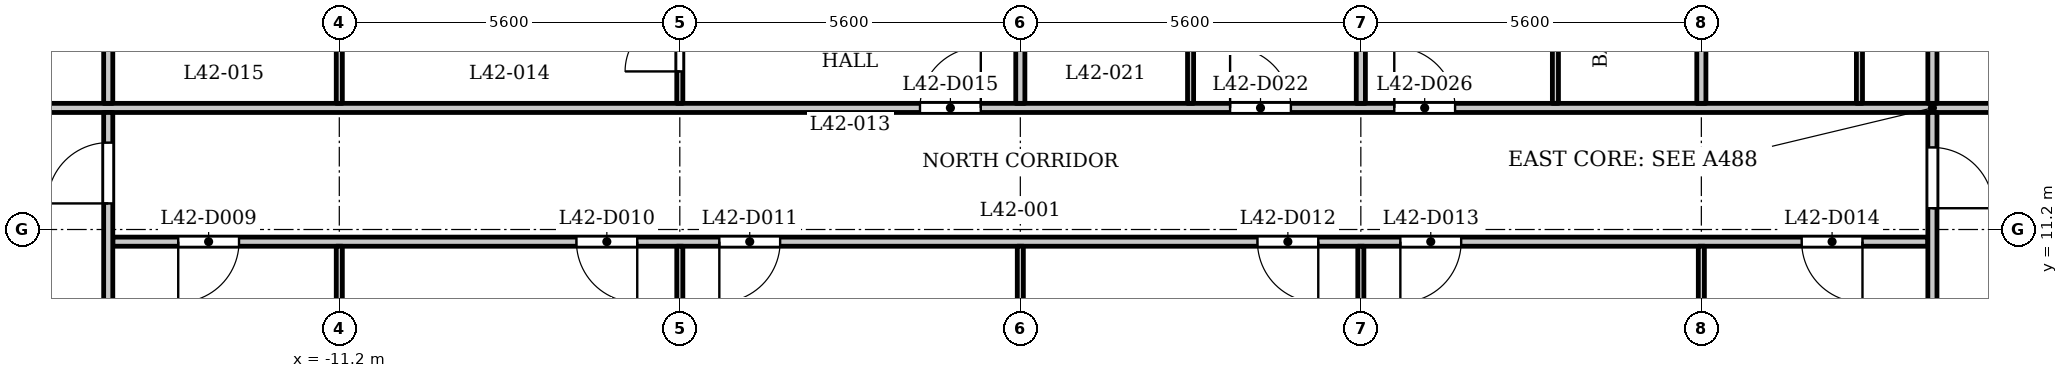
"""IFC4 building model, lengths in metres.
Left out: names, types, materials, properties, quantities, classifications, styles, units other than length and angle.
Written with IfcOpenShell. Run it as: python <this file> out.ifc"""

import sys

from ifc_helpers import new_model, si_unit, direction, frame, frame_2d, origin, place, context, subcontext, project, spatial, rectangle, extrude, element, fill, save


model = new_model("IFC4")
c1 = context("Model", 3, precision=1e-05, world=origin(), true_north=direction((0.0, 1.0)))
c2 = subcontext(c1, "Body", "Model", "MODEL_VIEW")
j1 = project(units=[si_unit("LENGTHUNIT", "METRE"), si_unit("PLANEANGLEUNIT", "RADIAN")], contexts=[c1])
p1 = place(None, origin())
s1 = spatial("IfcSite", under=j1, at=p1, CompositionType="ELEMENT")
p2 = place(p1, origin())
s2 = spatial("IfcBuilding", under=s1, at=p2, CompositionType="ELEMENT")
p3 = place(p2, frame((0.0, 0.0, 164.1)))
s3 = spatial("IfcBuildingStorey", under=s2, at=p3, CompositionType="ELEMENT", Elevation=164.1)
p4 = place(p3, frame((-14.925, 11.0, 0.0), z_axis=(0.0, 0.0, 1.0), x_axis=(1.0, 0.0, 0.0)))
e1 = element("IfcWall", 1, at=p4, inside=s3, PredefinedType="PARTITIONING", context=c2, shape_type="SweptSolid", body=[
    extrude(rectangle(XDim=29.85, YDim=0.15, at=frame_2d((14.925, 0.0))), origin(), (0.0, 0.0, 1.0), 3.2),
])
p5 = place(p4, frame((1.076, 0.0, 0.0)))
e2 = element("IfcOpeningElement", 2, at=p5, cuts=e1, PredefinedType="OPENING", context=c2, shape_type="SweptSolid", body=[
    extrude(rectangle(XDim=1.0, YDim=2.1, at=frame_2d((0.5, 1.05))), frame((0.0, 0.085, 0.0), z_axis=(0.0, -1.0, 0.0), x_axis=(1.0, 0.0, 0.0)), (0.0, 0.0, 1.0), 0.17),
])
p6 = place(p4, frame((7.625, 0.0, 0.0)))
e3 = element("IfcOpeningElement", 3, at=p6, cuts=e1, PredefinedType="OPENING", context=c2, shape_type="SweptSolid", body=[
    extrude(rectangle(XDim=1.0, YDim=2.1, at=frame_2d((0.5, 1.05))), frame((0.0, 0.085, 0.0), z_axis=(0.0, -1.0, 0.0), x_axis=(1.0, 0.0, 0.0)), (0.0, 0.0, 1.0), 0.17),
])
p7 = place(p4, frame((9.975, 0.0, 0.0)))
e4 = element("IfcOpeningElement", 4, at=p7, cuts=e1, PredefinedType="OPENING", context=c2, shape_type="SweptSolid", body=[
    extrude(rectangle(XDim=1.0, YDim=2.1, at=frame_2d((0.5, 1.05))), frame((0.0, 0.085, 0.0), z_axis=(0.0, -1.0, 0.0), x_axis=(1.0, 0.0, 0.0)), (0.0, 0.0, 1.0), 0.17),
])
p8 = place(p4, frame((18.825, 0.0, 0.0)))
e5 = element("IfcOpeningElement", 5, at=p8, cuts=e1, PredefinedType="OPENING", context=c2, shape_type="SweptSolid", body=[
    extrude(rectangle(XDim=1.0, YDim=2.1, at=frame_2d((0.5, 1.05))), frame((0.0, 0.085, 0.0), z_axis=(0.0, -1.0, 0.0), x_axis=(1.0, 0.0, 0.0)), (0.0, 0.0, 1.0), 0.17),
])
p9 = place(p4, frame((21.175, 0.0, 0.0)))
e6 = element("IfcOpeningElement", 6, at=p9, cuts=e1, PredefinedType="OPENING", context=c2, shape_type="SweptSolid", body=[
    extrude(rectangle(XDim=1.0, YDim=2.1, at=frame_2d((0.5, 1.05))), frame((0.0, 0.085, 0.0), z_axis=(0.0, -1.0, 0.0), x_axis=(1.0, 0.0, 0.0)), (0.0, 0.0, 1.0), 0.17),
])
p10 = place(p4, frame((27.775, 0.0, 0.0)))
e7 = element("IfcOpeningElement", 7, at=p10, cuts=e1, PredefinedType="OPENING", context=c2, shape_type="SweptSolid", body=[
    extrude(rectangle(XDim=1.0, YDim=2.1, at=frame_2d((0.5, 1.05))), frame((0.0, 0.085, 0.0), z_axis=(0.0, -1.0, 0.0), x_axis=(1.0, 0.0, 0.0)), (0.0, 0.0, 1.0), 0.17),
])
p11 = place(p3, frame((-17.4, 13.2, 0.0), z_axis=(0.0, 0.0, 1.0), x_axis=(1.0, 0.0, 0.0)))
e8 = element("IfcWall", 8, at=p11, inside=s3, PredefinedType="PARTITIONING", context=c2, shape_type="SweptSolid", body=[
    extrude(rectangle(XDim=34.8, YDim=0.15, at=frame_2d((17.4, 0.0))), origin(), (0.0, 0.0, 1.0), 3.2),
])
p12 = place(p11, frame((0.25, 0.0, 0.0)))
e9 = element("IfcOpeningElement", 9, at=p12, cuts=e8, PredefinedType="OPENING", context=c2, shape_type="SweptSolid", body=[
    extrude(rectangle(XDim=1.0, YDim=2.1, at=frame_2d((0.5, 1.05))), frame((0.0, 0.085, 0.0), z_axis=(0.0, -1.0, 0.0), x_axis=(1.0, 0.0, 0.0)), (0.0, 0.0, 1.0), 0.17),
])
p13 = place(p11, frame((33.65, 0.0, 0.0)))
e10 = element("IfcOpeningElement", 10, at=p13, cuts=e8, PredefinedType="OPENING", context=c2, shape_type="SweptSolid", body=[
    extrude(rectangle(XDim=1.0, YDim=2.1, at=frame_2d((0.5, 1.05))), frame((0.0, 0.085, 0.0), z_axis=(0.0, -1.0, 0.0), x_axis=(1.0, 0.0, 0.0)), (0.0, 0.0, 1.0), 0.17),
])
p14 = place(p11, frame((15.75, 0.0, 0.0)))
e11 = element("IfcOpeningElement", 11, at=p14, cuts=e8, PredefinedType="OPENING", context=c2, shape_type="SweptSolid", body=[
    extrude(rectangle(XDim=1.0, YDim=2.1, at=frame_2d((0.5, 1.05))), frame((0.0, 0.085, 0.0), z_axis=(0.0, -1.0, 0.0), x_axis=(1.0, 0.0, 0.0)), (0.0, 0.0, 1.0), 0.17),
])
p15 = place(p11, frame((20.85, 0.0, 0.0)))
e12 = element("IfcOpeningElement", 12, at=p15, cuts=e8, PredefinedType="OPENING", context=c2, shape_type="SweptSolid", body=[
    extrude(rectangle(XDim=1.0, YDim=2.1, at=frame_2d((0.5, 1.05))), frame((0.0, 0.085, 0.0), z_axis=(0.0, -1.0, 0.0), x_axis=(1.0, 0.0, 0.0)), (0.0, 0.0, 1.0), 0.17),
])
p16 = place(p11, frame((23.55, 0.0, 0.0)))
e13 = element("IfcOpeningElement", 13, at=p16, cuts=e8, PredefinedType="OPENING", context=c2, shape_type="SweptSolid", body=[
    extrude(rectangle(XDim=1.0, YDim=2.1, at=frame_2d((0.5, 1.05))), frame((0.0, 0.085, 0.0), z_axis=(0.0, -1.0, 0.0), x_axis=(1.0, 0.0, 0.0)), (0.0, 0.0, 1.0), 0.17),
])
p17 = place(p3, frame((-15.0, 6.769, 0.0), z_axis=(0.0, 0.0, 1.0), x_axis=(0.0, 1.0, 0.0)))
e14 = element("IfcWall", 14, at=p17, inside=s3, PredefinedType="PARTITIONING", context=c2, shape_type="SweptSolid", body=[
    extrude(rectangle(XDim=6.356, YDim=0.15, at=frame_2d((3.178, 0.0))), origin(), (0.0, 0.0, 1.0), 3.2),
])
p18 = place(p17, frame((4.86, 0.0, 0.0)))
e15 = element("IfcOpeningElement", 15, at=p18, cuts=e14, PredefinedType="OPENING", context=c2, shape_type="SweptSolid", body=[
    extrude(rectangle(XDim=1.0, YDim=2.1, at=frame_2d((0.5, 1.05))), frame((0.0, 0.085, 0.0), z_axis=(0.0, -1.0, 0.0), x_axis=(1.0, 0.0, 0.0)), (0.0, 0.0, 1.0), 0.17),
])
p19 = place(p3, frame((-15.0, 13.275, 0.0), z_axis=(0.0, 0.0, 1.0), x_axis=(0.0, 1.0, 0.0)))
e16 = element("IfcWall", 16, at=p19, inside=s3, PredefinedType="PARTITIONING", context=c2, shape_type="SweptSolid", body=[
    extrude(rectangle(XDim=2.05, YDim=0.15, at=frame_2d((1.025, 0.0))), origin(), (0.0, 0.0, 1.0), 3.2),
])
p20 = place(p3, frame((-11.2, 7.32, 0.0), z_axis=(0.0, 0.0, 1.0), x_axis=(0.0, 1.0, 0.0)))
e17 = element("IfcWall", 17, at=p20, inside=s3, PredefinedType="PARTITIONING", context=c2, shape_type="SweptSolid", body=[
    extrude(rectangle(XDim=3.605, YDim=0.1, at=frame_2d((1.802, 0.0))), origin(), (0.0, 0.0, 1.0), 3.2),
])
p21 = place(p3, frame((-11.2, 13.275, 0.0), z_axis=(0.0, 0.0, 1.0), x_axis=(0.0, 1.0, 0.0)))
e18 = element("IfcWall", 18, at=p21, inside=s3, PredefinedType="PARTITIONING", context=c2, shape_type="SweptSolid", body=[
    extrude(rectangle(XDim=3.775, YDim=0.1, at=frame_2d((1.888, 0.0))), origin(), (0.0, 0.0, 1.0), 3.2),
])
p22 = place(p21, frame((2.875, 0.0, 0.0)))
e19 = element("IfcOpeningElement", 19, at=p22, cuts=e18, PredefinedType="OPENING", context=c2, shape_type="SweptSolid", body=[
    extrude(rectangle(XDim=0.8, YDim=2.1, at=frame_2d((0.4, 1.05))), frame((0.0, 0.06, 0.0), z_axis=(0.0, -1.0, 0.0), x_axis=(1.0, 0.0, 0.0)), (0.0, 0.0, 1.0), 0.12),
])
p23 = place(p3, frame((-5.6, 7.32, 0.0), z_axis=(0.0, 0.0, 1.0), x_axis=(0.0, 1.0, 0.0)))
e20 = element("IfcWall", 20, at=p23, inside=s3, PredefinedType="PARTITIONING", context=c2, shape_type="SweptSolid", body=[
    extrude(rectangle(XDim=3.605, YDim=0.1, at=frame_2d((1.802, 0.0))), origin(), (0.0, 0.0, 1.0), 3.2),
])
p24 = place(p3, frame((-5.6, 13.275, 0.0), z_axis=(0.0, 0.0, 1.0), x_axis=(0.0, 1.0, 0.0)))
e21 = element("IfcWall", 21, at=p24, inside=s3, PredefinedType="PARTITIONING", context=c2, shape_type="SweptSolid", body=[
    extrude(rectangle(XDim=3.775, YDim=0.1, at=frame_2d((1.888, 0.0))), origin(), (0.0, 0.0, 1.0), 3.2),
])
p25 = place(p24, frame((0.525, 0.0, 0.0)))
e22 = element("IfcOpeningElement", 22, at=p25, cuts=e21, PredefinedType="OPENING", context=c2, shape_type="SweptSolid", body=[
    extrude(rectangle(XDim=0.9, YDim=2.1, at=frame_2d((0.45, 1.05))), frame((0.0, 0.06, 0.0), z_axis=(0.0, -1.0, 0.0), x_axis=(1.0, 0.0, 0.0)), (0.0, 0.0, 1.0), 0.12),
])
p26 = place(p3, frame((0.0, 7.32, 0.0), z_axis=(0.0, 0.0, 1.0), x_axis=(0.0, 1.0, 0.0)))
e23 = element("IfcWall", 23, at=p26, inside=s3, PredefinedType="PARTITIONING", context=c2, shape_type="SweptSolid", body=[
    extrude(rectangle(XDim=3.605, YDim=0.1, at=frame_2d((1.802, 0.0))), origin(), (0.0, 0.0, 1.0), 3.2),
])
p27 = place(p3, frame((0.0, 13.275, 0.0), z_axis=(0.0, 0.0, 1.0), x_axis=(0.0, 1.0, 0.0)))
e24 = element("IfcWall", 24, at=p27, inside=s3, PredefinedType="PARTITIONING", context=c2, shape_type="SweptSolid", body=[
    extrude(rectangle(XDim=3.775, YDim=0.15, at=frame_2d((1.888, 0.0))), origin(), (0.0, 0.0, 1.0), 3.2),
])
p28 = place(p3, frame((2.8, 13.275, 0.0), z_axis=(0.0, 0.0, 1.0), x_axis=(0.0, 1.0, 0.0)))
e25 = element("IfcWall", 25, at=p28, inside=s3, PredefinedType="PARTITIONING", context=c2, shape_type="SweptSolid", body=[
    extrude(rectangle(XDim=3.775, YDim=0.1, at=frame_2d((1.888, 0.0))), origin(), (0.0, 0.0, 1.0), 3.2),
])
p29 = place(p3, frame((5.6, 7.32, 0.0), z_axis=(0.0, 0.0, 1.0), x_axis=(0.0, 1.0, 0.0)))
e26 = element("IfcWall", 26, at=p29, inside=s3, PredefinedType="PARTITIONING", context=c2, shape_type="SweptSolid", body=[
    extrude(rectangle(XDim=3.605, YDim=0.1, at=frame_2d((1.802, 0.0))), origin(), (0.0, 0.0, 1.0), 3.2),
])
p30 = place(p3, frame((5.6, 13.275, 0.0), z_axis=(0.0, 0.0, 1.0), x_axis=(0.0, 1.0, 0.0)))
e27 = element("IfcWall", 27, at=p30, inside=s3, PredefinedType="PARTITIONING", context=c2, shape_type="SweptSolid", body=[
    extrude(rectangle(XDim=3.775, YDim=0.15, at=frame_2d((1.888, 0.0))), origin(), (0.0, 0.0, 1.0), 3.2),
])
p31 = place(p3, frame((8.8, 13.275, 0.0), z_axis=(0.0, 0.0, 1.0), x_axis=(0.0, 1.0, 0.0)))
e28 = element("IfcWall", 28, at=p31, inside=s3, PredefinedType="PARTITIONING", context=c2, shape_type="SweptSolid", body=[
    extrude(rectangle(XDim=3.775, YDim=0.1, at=frame_2d((1.888, 0.0))), origin(), (0.0, 0.0, 1.0), 3.2),
])
p32 = place(p3, frame((11.2, 7.32, 0.0), z_axis=(0.0, 0.0, 1.0), x_axis=(0.0, 1.0, 0.0)))
e29 = element("IfcWall", 29, at=p32, inside=s3, PredefinedType="PARTITIONING", context=c2, shape_type="SweptSolid", body=[
    extrude(rectangle(XDim=3.605, YDim=0.1, at=frame_2d((1.802, 0.0))), origin(), (0.0, 0.0, 1.0), 3.2),
])
p33 = place(p3, frame((11.2, 13.275, 0.0), z_axis=(0.0, 0.0, 1.0), x_axis=(0.0, 1.0, 0.0)))
e30 = element("IfcWall", 30, at=p33, inside=s3, PredefinedType="PARTITIONING", context=c2, shape_type="SweptSolid", body=[
    extrude(rectangle(XDim=3.775, YDim=0.15, at=frame_2d((1.888, 0.0))), origin(), (0.0, 0.0, 1.0), 3.2),
])
p34 = place(p3, frame((13.8, 13.275, 0.0), z_axis=(0.0, 0.0, 1.0), x_axis=(0.0, 1.0, 0.0)))
e31 = element("IfcWall", 31, at=p34, inside=s3, PredefinedType="PARTITIONING", context=c2, shape_type="SweptSolid", body=[
    extrude(rectangle(XDim=3.775, YDim=0.1, at=frame_2d((1.888, 0.0))), origin(), (0.0, 0.0, 1.0), 3.2),
])
p35 = place(p3, frame((15.0, 6.769, 0.0), z_axis=(0.0, 0.0, 1.0), x_axis=(0.0, 1.0, 0.0)))
e32 = element("IfcWall", 32, at=p35, inside=s3, PredefinedType="PARTITIONING", context=c2, shape_type="SweptSolid", body=[
    extrude(rectangle(XDim=6.356, YDim=0.15, at=frame_2d((3.178, 0.0))), origin(), (0.0, 0.0, 1.0), 3.2),
])
p36 = place(p35, frame((4.781, 0.0, 0.0)))
e33 = element("IfcOpeningElement", 33, at=p36, cuts=e32, PredefinedType="OPENING", context=c2, shape_type="SweptSolid", body=[
    extrude(rectangle(XDim=1.0, YDim=2.1, at=frame_2d((0.5, 1.05))), frame((0.0, 0.085, 0.0), z_axis=(0.0, -1.0, 0.0), x_axis=(1.0, 0.0, 0.0)), (0.0, 0.0, 1.0), 0.17),
])
p37 = place(p3, frame((15.0, 13.275, 0.0), z_axis=(0.0, 0.0, 1.0), x_axis=(0.0, 1.0, 0.0)))
e34 = element("IfcWall", 34, at=p37, inside=s3, PredefinedType="PARTITIONING", context=c2, shape_type="SweptSolid", body=[
    extrude(rectangle(XDim=2.05, YDim=0.15, at=frame_2d((1.025, 0.0))), origin(), (0.0, 0.0, 1.0), 3.2),
])
p38 = place(p18, origin())
e35 = element("IfcDoor", 35, at=p38, inside=s3, OperationType="SINGLE_SWING_RIGHT", PredefinedType="DOOR", context=c2, shape_type="SweptSolid", body=[
    extrude(rectangle(XDim=1.0, YDim=2.1, at=frame_2d((0.5, 1.05))), frame((0.0, 0.025, 0.0), z_axis=(0.0, -1.0, 0.0), x_axis=(1.0, 0.0, 0.0)), (0.0, 0.0, 1.0), 0.05),
])
fill(e15, e35)
p39 = place(p36, origin())
e36 = element("IfcDoor", 36, at=p39, inside=s3, OperationType="SINGLE_SWING_LEFT", PredefinedType="DOOR", context=c2, shape_type="SweptSolid", body=[
    extrude(rectangle(XDim=1.0, YDim=2.1, at=frame_2d((0.5, 1.05))), frame((0.0, 0.025, 0.0), z_axis=(0.0, -1.0, 0.0), x_axis=(1.0, 0.0, 0.0)), (0.0, 0.0, 1.0), 0.05),
])
fill(e33, e36)
p40 = place(p5, origin())
e37 = element("IfcDoor", 37, at=p40, inside=s3, OperationType="SINGLE_SWING_LEFT", PredefinedType="DOOR", context=c2, shape_type="SweptSolid", body=[
    extrude(rectangle(XDim=1.0, YDim=2.1, at=frame_2d((0.5, 1.05))), frame((0.0, 0.025, 0.0), z_axis=(0.0, -1.0, 0.0), x_axis=(1.0, 0.0, 0.0)), (0.0, 0.0, 1.0), 0.05),
])
fill(e2, e37)
p41 = place(p6, origin())
e38 = element("IfcDoor", 38, at=p41, inside=s3, OperationType="SINGLE_SWING_RIGHT", PredefinedType="DOOR", context=c2, shape_type="SweptSolid", body=[
    extrude(rectangle(XDim=1.0, YDim=2.1, at=frame_2d((0.5, 1.05))), frame((0.0, 0.025, 0.0), z_axis=(0.0, -1.0, 0.0), x_axis=(1.0, 0.0, 0.0)), (0.0, 0.0, 1.0), 0.05),
])
fill(e3, e38)
p42 = place(p7, origin())
e39 = element("IfcDoor", 39, at=p42, inside=s3, OperationType="SINGLE_SWING_LEFT", PredefinedType="DOOR", context=c2, shape_type="SweptSolid", body=[
    extrude(rectangle(XDim=1.0, YDim=2.1, at=frame_2d((0.5, 1.05))), frame((0.0, 0.025, 0.0), z_axis=(0.0, -1.0, 0.0), x_axis=(1.0, 0.0, 0.0)), (0.0, 0.0, 1.0), 0.05),
])
fill(e4, e39)
p43 = place(p8, origin())
e40 = element("IfcDoor", 40, at=p43, inside=s3, OperationType="SINGLE_SWING_RIGHT", PredefinedType="DOOR", context=c2, shape_type="SweptSolid", body=[
    extrude(rectangle(XDim=1.0, YDim=2.1, at=frame_2d((0.5, 1.05))), frame((0.0, 0.025, 0.0), z_axis=(0.0, -1.0, 0.0), x_axis=(1.0, 0.0, 0.0)), (0.0, 0.0, 1.0), 0.05),
])
fill(e5, e40)
p44 = place(p9, origin())
e41 = element("IfcDoor", 41, at=p44, inside=s3, OperationType="SINGLE_SWING_LEFT", PredefinedType="DOOR", context=c2, shape_type="SweptSolid", body=[
    extrude(rectangle(XDim=1.0, YDim=2.1, at=frame_2d((0.5, 1.05))), frame((0.0, 0.025, 0.0), z_axis=(0.0, -1.0, 0.0), x_axis=(1.0, 0.0, 0.0)), (0.0, 0.0, 1.0), 0.05),
])
fill(e6, e41)
p45 = place(p10, origin())
e42 = element("IfcDoor", 42, at=p45, inside=s3, OperationType="SINGLE_SWING_RIGHT", PredefinedType="DOOR", context=c2, shape_type="SweptSolid", body=[
    extrude(rectangle(XDim=1.0, YDim=2.1, at=frame_2d((0.5, 1.05))), frame((0.0, 0.025, 0.0), z_axis=(0.0, -1.0, 0.0), x_axis=(1.0, 0.0, 0.0)), (0.0, 0.0, 1.0), 0.05),
])
fill(e7, e42)
p46 = place(p14, origin())
e43 = element("IfcDoor", 43, at=p46, inside=s3, OperationType="SINGLE_SWING_LEFT", PredefinedType="DOOR", context=c2, shape_type="SweptSolid", body=[
    extrude(rectangle(XDim=1.0, YDim=2.1, at=frame_2d((0.5, 1.05))), frame((0.0, 0.025, 0.0), z_axis=(0.0, -1.0, 0.0), x_axis=(1.0, 0.0, 0.0)), (0.0, 0.0, 1.0), 0.05),
])
fill(e11, e43)
p47 = place(p25, origin())
e44 = element("IfcDoor", 44, at=p47, inside=s3, OperationType="SINGLE_SWING_RIGHT", PredefinedType="DOOR", context=c2, shape_type="SweptSolid", body=[
    extrude(rectangle(XDim=0.9, YDim=2.1, at=frame_2d((0.45, 1.05))), frame((0.0, 0.025, 0.0), z_axis=(0.0, -1.0, 0.0), x_axis=(1.0, 0.0, 0.0)), (0.0, 0.0, 1.0), 0.05),
])
fill(e22, e44)
p48 = place(p15, origin())
e45 = element("IfcDoor", 45, at=p48, inside=s3, OperationType="SINGLE_SWING_RIGHT", PredefinedType="DOOR", context=c2, shape_type="SweptSolid", body=[
    extrude(rectangle(XDim=1.0, YDim=2.1, at=frame_2d((0.5, 1.05))), frame((0.0, 0.025, 0.0), z_axis=(0.0, -1.0, 0.0), x_axis=(1.0, 0.0, 0.0)), (0.0, 0.0, 1.0), 0.05),
])
fill(e12, e45)
p49 = place(p16, origin())
e46 = element("IfcDoor", 46, at=p49, inside=s3, OperationType="SINGLE_SWING_RIGHT", PredefinedType="DOOR", context=c2, shape_type="SweptSolid", body=[
    extrude(rectangle(XDim=1.0, YDim=2.1, at=frame_2d((0.5, 1.05))), frame((0.0, 0.025, 0.0), z_axis=(0.0, -1.0, 0.0), x_axis=(1.0, 0.0, 0.0)), (0.0, 0.0, 1.0), 0.05),
])
fill(e13, e46)
save(model, sys.argv[1])
